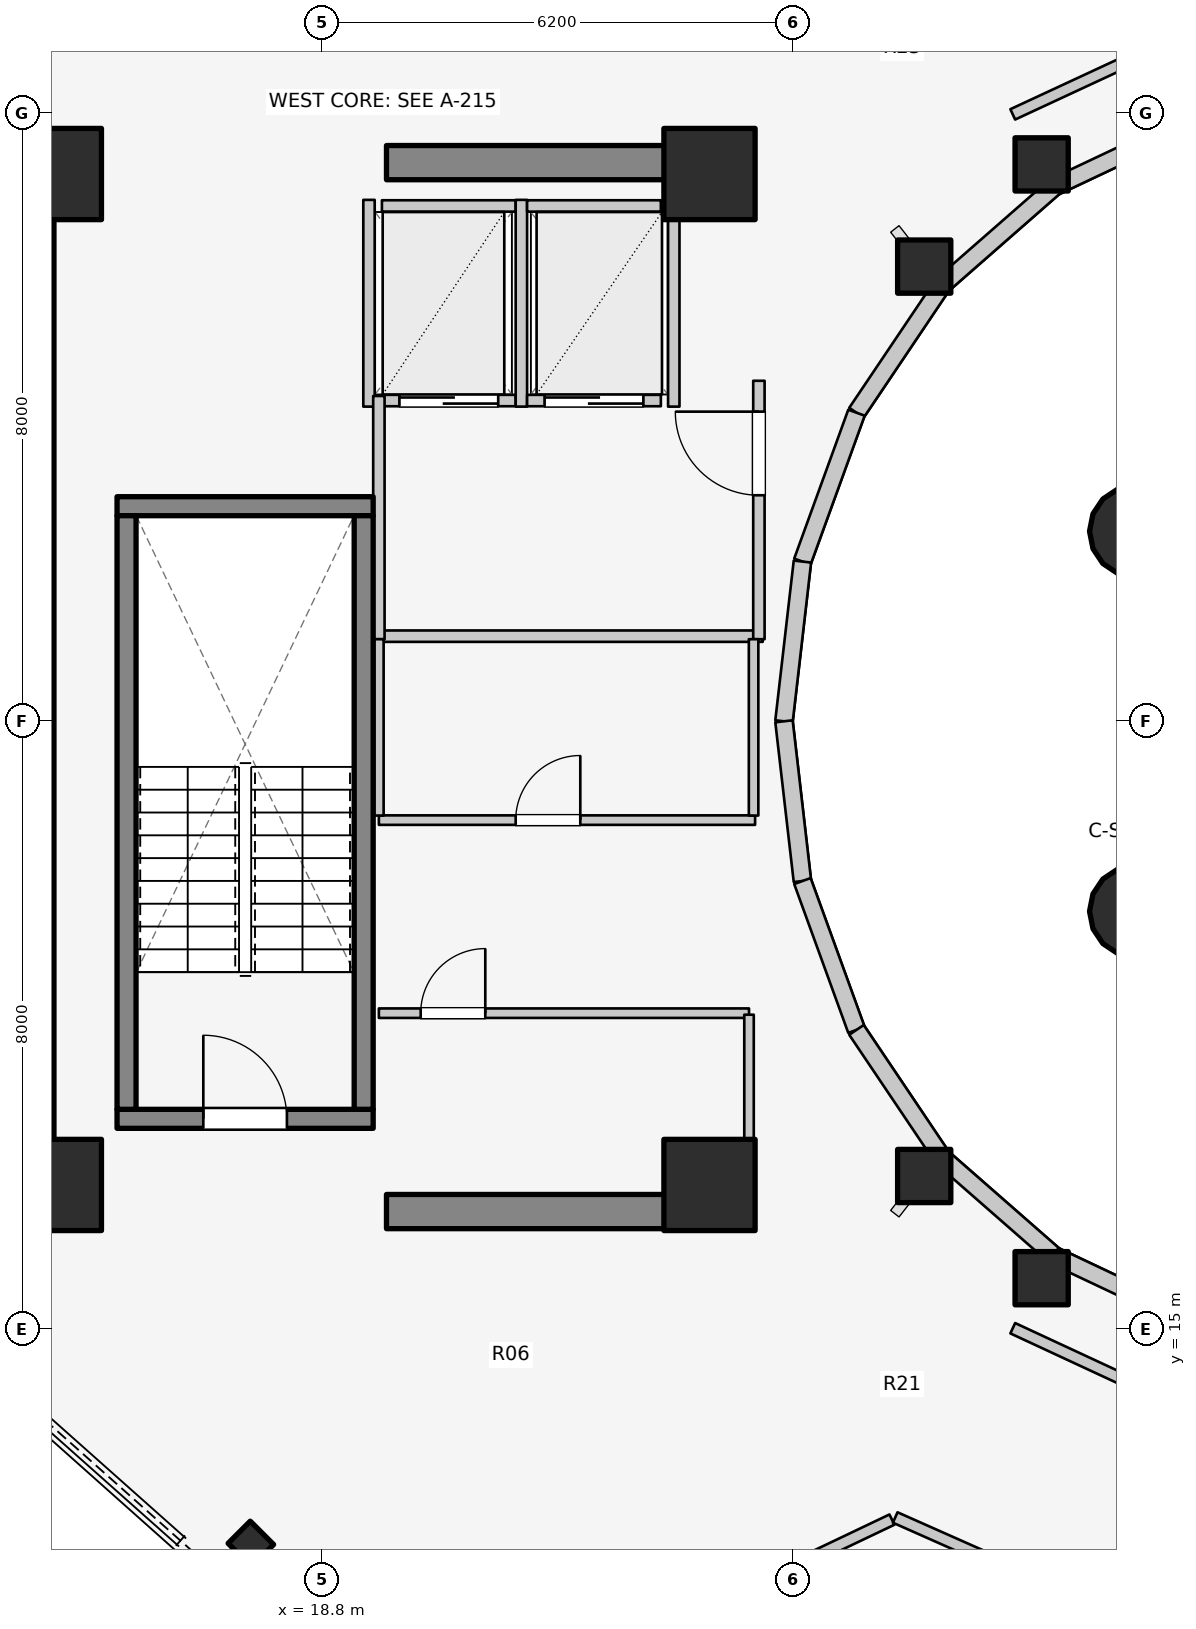
"""IFC4 building model, lengths in metres.
Left out: names, types, materials, properties, quantities, classifications, styles, units other than length and angle.
Written with IfcOpenShell. Run it as: python <this file> out.ifc"""

import sys

from ifc_helpers import new_model, si_unit, direction, frame, frame_2d, origin, origin_2d, place, context, subcontext, project, spatial, rectangle, hollow_circle, i_section, extrude, element, fill, save


model = new_model("IFC4")
c1 = context("Model", 3, precision=1e-05, world=origin(), true_north=direction((0.0, 1.0)))
c2 = subcontext(c1, "Body", "Model", "MODEL_VIEW")
j1 = project(units=[si_unit("LENGTHUNIT", "METRE"), si_unit("PLANEANGLEUNIT", "RADIAN")], contexts=[c1])
p1 = place(None, origin())
s1 = spatial("IfcSite", under=j1, at=p1, CompositionType="ELEMENT")
p2 = place(p1, origin())
s2 = spatial("IfcBuilding", under=s1, at=p2, CompositionType="ELEMENT")
p3 = place(p2, frame((0.0, 0.0, 270.0)))
s3 = spatial("IfcBuildingStorey", under=s2, at=p3, CompositionType="ELEMENT", Elevation=270.0)
p4 = place(p3, frame((15.05, 17.05, 0.0), z_axis=(0.0, 0.0, 1.0), x_axis=(0.0, 1.0, 0.0)))
e1 = element("IfcWall", 1, at=p4, inside=s3, PredefinedType="SHEAR", context=c2, shape_type="SweptSolid", body=[
    extrude(rectangle(XDim=12.8, YDim=0.45, at=frame_2d((6.4, 0.0))), origin(), (0.0, 0.0, 1.0), 3.2),
])
for number, where, z_axis, x_axis in (
    (2, (19.65, 16.55, 0.0), (0.0, 0.0, 1.0), (1.0, 0.0, 0.0)),
    (3, (19.65, 30.35, 0.0), (0.0, 0.0, 1.0), (1.0, 0.0, 0.0)),
):
    element("IfcWall", number, at=place(p3, frame(where, z_axis=z_axis, x_axis=x_axis)), inside=s3, PredefinedType="SHEAR", context=c2, shape_type="SweptSolid", body=[
        extrude(rectangle(XDim=4.5, YDim=0.45, at=frame_2d((2.25, 0.0))), origin(), (0.0, 0.0, 1.0), 3.2),
    ])
p5 = place(p3, frame((16.105, 17.77, 0.0), z_axis=(0.0, 0.0, 1.0), x_axis=(1.0, 0.0, 0.0)))
e4 = element("IfcWall", 4, at=p5, inside=s3, PredefinedType="SOLIDWALL", context=c2, shape_type="SweptSolid", body=[
    extrude(rectangle(XDim=3.37, YDim=0.25, at=frame_2d((1.685, 0.0))), origin(), (0.0, 0.0, 1.0), 3.2),
])
p6 = place(p5, frame((1.135, 0.0, 0.0)))
e5 = element("IfcOpeningElement", 5, at=p6, cuts=e4, PredefinedType="OPENING", context=c2, shape_type="SweptSolid", body=[
    extrude(rectangle(XDim=1.1, YDim=2.1, at=frame_2d((0.55, 1.05))), frame((0.0, 0.135, 0.0), z_axis=(0.0, -1.0, 0.0), x_axis=(1.0, 0.0, 0.0)), (0.0, 0.0, 1.0), 0.27),
])
p7 = place(p3, frame((16.105, 25.83, 0.0), z_axis=(0.0, 0.0, 1.0), x_axis=(1.0, 0.0, 0.0)))
e6 = element("IfcWall", 6, at=p7, inside=s3, PredefinedType="SOLIDWALL", context=c2, shape_type="SweptSolid", body=[
    extrude(rectangle(XDim=3.37, YDim=0.25, at=frame_2d((1.685, 0.0))), origin(), (0.0, 0.0, 1.0), 3.2),
])
for number, where, z_axis, x_axis in (
    (7, (16.23, 17.895, 0.0), (0.0, 0.0, 1.0), (0.0, 1.0, 0.0)),
    (8, (19.35, 17.895, 0.0), (0.0, 0.0, 1.0), (0.0, 1.0, 0.0)),
):
    element("IfcWall", number, at=place(p3, frame(where, z_axis=z_axis, x_axis=x_axis)), inside=s3, PredefinedType="SOLIDWALL", context=c2, shape_type="SweptSolid", body=[
        extrude(rectangle(XDim=7.81, YDim=0.25, at=frame_2d((3.905, 0.0))), origin(), (0.0, 0.0, 1.0), 3.2),
    ])
for number, where, z_axis, x_axis in (
    (9, (15.3, 16.9, 0.0), (0.0, 0.0, 1.0), (1.0, 0.0, 0.0)),
    (10, (23.9, 16.9, 0.0), (0.0, 0.0, 1.0), (1.0, 0.0, 0.0)),
    (11, (23.9, 30.2, 0.0), (0.0, 0.0, 1.0), (1.0, 0.0, 0.0)),
    (12, (15.3, 30.2, 0.0), (0.0, 0.0, 1.0), (1.0, 0.0, 0.0)),
):
    element("IfcColumn", number, at=place(p3, frame(where, z_axis=z_axis, x_axis=x_axis)), inside=s3, PredefinedType="COLUMN", context=c2, shape_type="SweptSolid", body=[
        extrude(rectangle(XDim=1.2, YDim=1.2, at=origin_2d()), origin(), (0.0, 0.0, 1.0), 3.2),
    ])
for number, where, z_axis, x_axis in (
    (13, (28.27, 30.327, 0.0), (0.0, 0.0, 1.0), (1.0, 0.0, 0.0)),
    (14, (26.725, 28.982, 0.0), (0.0, 0.0, 1.0), (1.0, 0.0, 0.0)),
    (15, (26.725, 17.018, 0.0), (0.0, 0.0, 1.0), (1.0, 0.0, 0.0)),
):
    element("IfcColumn", number, at=place(p3, frame(where, z_axis=z_axis, x_axis=x_axis)), inside=s3, PredefinedType="COLUMN", context=c2, shape_type="SweptSolid", body=[
        extrude(rectangle(XDim=0.7, YDim=0.7, at=origin_2d()), origin(), (0.0, 0.0, 1.0), 3.2),
    ])
p8 = place(p3, frame((17.866, 12.177, 0.0), z_axis=(0.0, 0.0, 1.0), x_axis=(-0.707106781187, -0.707106781187, 0.0)))
e16 = element("IfcColumn", 16, at=p8, inside=s3, PredefinedType="COLUMN", context=c2, shape_type="SweptSolid", body=[
    extrude(i_section(OverallWidth=0.412, OverallDepth=0.435, WebThickness=0.036, FlangeThickness=0.057, FilletRadius=0.025, at=origin_2d()), origin(), (0.0, 0.0, 1.0), 3.2),
])
p9 = place(p3, frame((28.27, 15.673, 0.0), z_axis=(0.0, 0.0, 1.0), x_axis=(1.0, 0.0, 0.0)))
e17 = element("IfcColumn", 17, at=p9, inside=s3, PredefinedType="COLUMN", context=c2, shape_type="SweptSolid", body=[
    extrude(rectangle(XDim=0.7, YDim=0.7, at=origin_2d()), origin(), (0.0, 0.0, 1.0), 3.2),
])
for number, where, z_axis, x_axis in (
    (18, (29.5, 20.5, 0.0), (0.0, 0.0, 1.0), (1.0, 0.0, 0.0)),
    (19, (29.5, 25.5, 0.0), (0.0, 0.0, 1.0), (1.0, 0.0, 0.0)),
):
    element("IfcColumn", number, at=place(p3, frame(where, z_axis=z_axis, x_axis=x_axis)), inside=s3, PredefinedType="PILASTER", context=c2, shape_type="SweptSolid", body=[
        extrude(hollow_circle(Radius=0.6, WallThickness=0.032, at=origin_2d()), origin(), (0.0, 0.0, 1.0), 3.2),
    ])
p10 = place(p3, frame((30.157, 30.843, 0.0), z_axis=(0.0, 0.0, 1.0), x_axis=(-0.904179699603, -0.427152280606, 0.0)))
e20 = element("IfcWall", 20, at=p10, inside=s3, PredefinedType="STANDARD", context=c2, shape_type="SweptSolid", body=[
    extrude(rectangle(XDim=1.899, YDim=0.23, at=frame_2d((0.95, 0.0))), origin(), (0.0, 0.0, 1.0), 1.32),
])
p11 = place(p3, frame((28.44, 30.032, 0.0), z_axis=(0.0, 0.0, 1.0), x_axis=(-0.752576694707, -0.658504607869, 0.0)))
e21 = element("IfcWall", 21, at=p11, inside=s3, PredefinedType="STANDARD", context=c2, shape_type="SweptSolid", body=[
    extrude(rectangle(XDim=1.959, YDim=0.23, at=frame_2d((0.98, 0.0))), origin(), (0.0, 0.0, 1.0), 1.32),
])
p12 = place(p3, frame((26.965, 28.742, 0.0), z_axis=(0.0, 0.0, 1.0), x_axis=(-0.558197800898, -0.829707909492, 0.0)))
e22 = element("IfcWall", 22, at=p12, inside=s3, PredefinedType="STANDARD", context=c2, shape_type="SweptSolid", body=[
    extrude(rectangle(XDim=2.027, YDim=0.23, at=frame_2d((1.013, 0.0))), origin(), (0.0, 0.0, 1.0), 1.32),
])
p13 = place(p3, frame((25.834, 27.06, 0.0), z_axis=(0.0, 0.0, 1.0), x_axis=(-0.341423187295, -0.93990968033, 0.0)))
e23 = element("IfcWall", 23, at=p13, inside=s3, PredefinedType="STANDARD", context=c2, shape_type="SweptSolid", body=[
    extrude(rectangle(XDim=2.084, YDim=0.23, at=frame_2d((1.042, 0.0))), origin(), (0.0, 0.0, 1.0), 2.9),
])
for number, where, z_axis, x_axis in (
    (24, (25.123, 25.102, 0.0), (0.0, 0.0, 1.0), (-0.115, -0.993, 0.0)),
    (25, (24.88, 23.0, 0.0), (0.0, 0.0, 1.0), (0.115, -0.993, 0.0)),
):
    element("IfcWall", number, at=place(p3, frame(where, z_axis=z_axis, x_axis=x_axis)), inside=s3, PredefinedType="STANDARD", context=c2, shape_type="SweptSolid", body=[
        extrude(rectangle(XDim=2.115, YDim=0.23, at=frame_2d((1.058, 0.0))), origin(), (0.0, 0.0, 1.0), 2.9),
    ])
p14 = place(p3, frame((25.123, 20.898, 0.0), z_axis=(0.0, 0.0, 1.0), x_axis=(0.341423187295, -0.93990968033, 0.0)))
e26 = element("IfcWall", 26, at=p14, inside=s3, PredefinedType="STANDARD", context=c2, shape_type="SweptSolid", body=[
    extrude(rectangle(XDim=2.084, YDim=0.23, at=frame_2d((1.042, 0.0))), origin(), (0.0, 0.0, 1.0), 2.9),
])
p15 = place(p3, frame((25.834, 18.94, 0.0), z_axis=(0.0, 0.0, 1.0), x_axis=(0.558197800898, -0.829707909492, 0.0)))
e27 = element("IfcWall", 27, at=p15, inside=s3, PredefinedType="STANDARD", context=c2, shape_type="SweptSolid", body=[
    extrude(rectangle(XDim=2.027, YDim=0.23, at=frame_2d((1.013, 0.0))), origin(), (0.0, 0.0, 1.0), 1.32),
])
p16 = place(p3, frame((26.965, 17.258, 0.0), z_axis=(0.0, 0.0, 1.0), x_axis=(0.752576694707, -0.658504607869, 0.0)))
e28 = element("IfcWall", 28, at=p16, inside=s3, PredefinedType="STANDARD", context=c2, shape_type="SweptSolid", body=[
    extrude(rectangle(XDim=1.959, YDim=0.23, at=frame_2d((0.98, 0.0))), origin(), (0.0, 0.0, 1.0), 1.32),
])
p17 = place(p3, frame((28.44, 15.968, 0.0), z_axis=(0.0, 0.0, 1.0), x_axis=(0.904179699603, -0.427152280606, 0.0)))
e29 = element("IfcWall", 29, at=p17, inside=s3, PredefinedType="STANDARD", context=c2, shape_type="SweptSolid", body=[
    extrude(rectangle(XDim=1.899, YDim=0.23, at=frame_2d((0.95, 0.0))), origin(), (0.0, 0.0, 1.0), 1.32),
])
p18 = place(p3, frame((17.453, 34.236, 0.0), z_axis=(0.0, 0.0, 1.0), x_axis=(-0.747315206756, -0.664469699649, 0.0)))
e30 = element("IfcWall", 30, at=p18, inside=s3, PredefinedType="STANDARD", context=c2, shape_type="SweptSolid", body=[
    extrude(rectangle(XDim=4.008, YDim=0.26, at=frame_2d((2.004, 0.0))), origin(), (0.0, 0.0, 1.0), 1.32),
])
p19 = place(p3, frame((19.59, 27.22, 0.0), z_axis=(0.0, 0.0, 1.0), x_axis=(1.0, 0.0, 0.0)))
e31 = element("IfcWall", 31, at=p19, inside=s3, PredefinedType="SOLIDWALL", context=c2, shape_type="SweptSolid", body=[
    extrude(rectangle(XDim=1.76, YDim=0.15, at=frame_2d((0.88, 0.0))), origin(), (0.0, 0.0, 1.0), 2.915),
])
p20 = place(p19, frame((0.23, 0.0, 0.0)))
e32 = element("IfcOpeningElement", 32, at=p20, cuts=e31, PredefinedType="OPENING", context=c2, shape_type="SweptSolid", body=[
    extrude(rectangle(XDim=1.3, YDim=2.1, at=frame_2d((0.65, 1.05))), frame((0.0, 0.085, 0.0), z_axis=(0.0, -1.0, 0.0), x_axis=(1.0, 0.0, 0.0)), (0.0, 0.0, 1.0), 0.17),
])
p21 = place(p3, frame((19.59, 29.78, 0.0), z_axis=(0.0, 0.0, 1.0), x_axis=(1.0, 0.0, 0.0)))
e33 = element("IfcWall", 33, at=p21, inside=s3, PredefinedType="SOLIDWALL", context=c2, shape_type="SweptSolid", body=[
    extrude(rectangle(XDim=1.76, YDim=0.15, at=frame_2d((0.88, 0.0))), origin(), (0.0, 0.0, 1.0), 2.915),
])
for number, where, z_axis, x_axis in (
    (34, (19.42, 27.14, 0.0), (0.0, 0.0, 1.0), (0.0, 1.0, 0.0)),
    (35, (21.425, 27.14, 0.0), (0.0, 0.0, 1.0), (0.0, 1.0, 0.0)),
):
    element("IfcWall", number, at=place(p3, frame(where, z_axis=z_axis, x_axis=x_axis)), inside=s3, PredefinedType="SOLIDWALL", context=c2, shape_type="SweptSolid", body=[
        extrude(rectangle(XDim=2.72, YDim=0.15, at=frame_2d((1.36, 0.0))), origin(), (0.0, 0.0, 1.0), 2.915),
    ])
p22 = place(p3, frame((21.5, 27.22, 0.0), z_axis=(0.0, 0.0, 1.0), x_axis=(1.0, 0.0, 0.0)))
e36 = element("IfcWall", 36, at=p22, inside=s3, PredefinedType="SOLIDWALL", context=c2, shape_type="SweptSolid", body=[
    extrude(rectangle(XDim=1.76, YDim=0.15, at=frame_2d((0.88, 0.0))), origin(), (0.0, 0.0, 1.0), 2.915),
])
p23 = place(p22, frame((0.23, 0.0, 0.0)))
e37 = element("IfcOpeningElement", 37, at=p23, cuts=e36, PredefinedType="OPENING", context=c2, shape_type="SweptSolid", body=[
    extrude(rectangle(XDim=1.3, YDim=2.1, at=frame_2d((0.65, 1.05))), frame((0.0, 0.085, 0.0), z_axis=(0.0, -1.0, 0.0), x_axis=(1.0, 0.0, 0.0)), (0.0, 0.0, 1.0), 0.17),
])
p24 = place(p3, frame((21.5, 29.78, 0.0), z_axis=(0.0, 0.0, 1.0), x_axis=(1.0, 0.0, 0.0)))
e38 = element("IfcWall", 38, at=p24, inside=s3, PredefinedType="SOLIDWALL", context=c2, shape_type="SweptSolid", body=[
    extrude(rectangle(XDim=1.76, YDim=0.15, at=frame_2d((0.88, 0.0))), origin(), (0.0, 0.0, 1.0), 2.915),
])
p25 = place(p3, frame((23.43, 27.14, 0.0), z_axis=(0.0, 0.0, 1.0), x_axis=(0.0, 1.0, 0.0)))
e39 = element("IfcWall", 39, at=p25, inside=s3, PredefinedType="SOLIDWALL", context=c2, shape_type="SweptSolid", body=[
    extrude(rectangle(XDim=2.72, YDim=0.15, at=frame_2d((1.36, 0.0))), origin(), (0.0, 0.0, 1.0), 2.915),
])
p26 = place(p3, frame((19.52, 24.12, 0.0), z_axis=(0.0, 0.0, 1.0), x_axis=(1.0, 0.0, 0.0)))
e40 = element("IfcWall", 40, at=p26, inside=s3, PredefinedType="PARTITIONING", context=c2, shape_type="SweptSolid", body=[
    extrude(rectangle(XDim=5.08, YDim=0.15, at=frame_2d((2.54, 0.0))), origin(), (0.0, 0.0, 1.0), 2.22),
])
p27 = place(p3, frame((19.55, 24.08, 0.0), z_axis=(0.0, 0.0, 1.0), x_axis=(0.0, 1.0, 0.0)))
e41 = element("IfcWall", 41, at=p27, inside=s3, PredefinedType="PARTITIONING", context=c2, shape_type="SweptSolid", body=[
    extrude(rectangle(XDim=3.2, YDim=0.15, at=frame_2d((1.6, 0.0))), origin(), (0.0, 0.0, 1.0), 2.915),
])
p28 = place(p3, frame((24.55, 24.08, 0.0), z_axis=(0.0, 0.0, 1.0), x_axis=(0.0, 1.0, 0.0)))
e42 = element("IfcWall", 42, at=p28, inside=s3, PredefinedType="PARTITIONING", context=c2, shape_type="SweptSolid", body=[
    extrude(rectangle(XDim=3.4, YDim=0.15, at=frame_2d((1.7, 0.0))), origin(), (0.0, 0.0, 1.0), 2.915),
])
p29 = place(p28, frame((1.894, 0.0, 0.0)))
e43 = element("IfcOpeningElement", 43, at=p29, cuts=e42, PredefinedType="OPENING", context=c2, shape_type="SweptSolid", body=[
    extrude(rectangle(XDim=1.1, YDim=2.1, at=frame_2d((0.55, 1.05))), frame((0.0, 0.085, 0.0), z_axis=(0.0, -1.0, 0.0), x_axis=(1.0, 0.0, 0.0)), (0.0, 0.0, 1.0), 0.17),
])
p30 = place(p3, frame((19.55, 19.16, 0.0), z_axis=(0.0, 0.0, 1.0), x_axis=(1.0, 0.0, 0.0)))
e44 = element("IfcWall", 44, at=p30, inside=s3, PredefinedType="PARTITIONING", context=c2, shape_type="SweptSolid", body=[
    extrude(rectangle(XDim=4.87, YDim=0.125, at=frame_2d((2.435, 0.0))), origin(), (0.0, 0.0, 1.0), 2.22),
])
p31 = place(p30, frame((0.55, 0.0, 0.0)))
e45 = element("IfcOpeningElement", 45, at=p31, cuts=e44, PredefinedType="OPENING", context=c2, shape_type="SweptSolid", body=[
    extrude(rectangle(XDim=0.85, YDim=2.05, at=frame_2d((0.425, 1.025))), frame((0.0, 0.073, 0.0), z_axis=(0.0, -1.0, 0.0), x_axis=(1.0, 0.0, 0.0)), (0.0, 0.0, 1.0), 0.145),
])
p32 = place(p3, frame((24.42, 17.1, 0.0), z_axis=(0.0, 0.0, 1.0), x_axis=(0.0, 1.0, 0.0)))
e46 = element("IfcWall", 46, at=p32, inside=s3, PredefinedType="PARTITIONING", context=c2, shape_type="SweptSolid", body=[
    extrude(rectangle(XDim=2.04, YDim=0.125, at=frame_2d((1.02, 0.0))), origin(), (0.0, 0.0, 1.0), 2.491),
])
p33 = place(p3, frame((19.55, 21.7, 0.0), z_axis=(0.0, 0.0, 1.0), x_axis=(1.0, 0.0, 0.0)))
e47 = element("IfcWall", 47, at=p33, inside=s3, PredefinedType="PARTITIONING", context=c2, shape_type="SweptSolid", body=[
    extrude(rectangle(XDim=4.95, YDim=0.125, at=frame_2d((2.475, 0.0))), origin(), (0.0, 0.0, 1.0), 2.22),
])
p34 = place(p33, frame((1.8, 0.0, 0.0)))
e48 = element("IfcOpeningElement", 48, at=p34, cuts=e47, PredefinedType="OPENING", context=c2, shape_type="SweptSolid", body=[
    extrude(rectangle(XDim=0.85, YDim=2.05, at=frame_2d((0.425, 1.025))), frame((0.0, 0.073, 0.0), z_axis=(0.0, -1.0, 0.0), x_axis=(1.0, 0.0, 0.0)), (0.0, 0.0, 1.0), 0.145),
])
for number, where, z_axis, x_axis in (
    (49, (19.55, 21.76, 0.0), (0.0, 0.0, 1.0), (0.0, 1.0, 0.0)),
    (50, (24.48, 21.76, 0.0), (0.0, 0.0, 1.0), (0.0, 1.0, 0.0)),
):
    element("IfcWall", number, at=place(p3, frame(where, z_axis=z_axis, x_axis=x_axis)), inside=s3, PredefinedType="PARTITIONING", context=c2, shape_type="SweptSolid", body=[
        extrude(rectangle(XDim=2.32, YDim=0.125, at=frame_2d((1.16, 0.0))), origin(), (0.0, 0.0, 1.0), 2.915),
    ])
for number, where, z_axis, x_axis in (
    (51, (29.873, 31.906, 0.0), (0.0, 0.0, 1.0), (-0.907, -0.421, 0.0)),
    (52, (27.89, 15.015, 0.0), (0.0, 0.0, 1.0), (0.907, -0.421, 0.0)),
):
    element("IfcWall", number, at=place(p3, frame(where, z_axis=z_axis, x_axis=x_axis)), inside=s3, PredefinedType="PARTITIONING", context=c2, shape_type="SweptSolid", body=[
        extrude(rectangle(XDim=2.186, YDim=0.15, at=frame_2d((1.093, 0.0))), origin(), (0.0, 0.0, 1.0), 1.32),
    ])
p35 = place(p3, frame((26.3, 12.497, 0.0), z_axis=(0.0, 0.0, 1.0), x_axis=(-0.902738701359, -0.430189303758, 0.0)))
e53 = element("IfcWall", 53, at=p35, inside=s3, PredefinedType="PARTITIONING", context=c2, shape_type="SweptSolid", body=[
    extrude(rectangle(XDim=5.521, YDim=0.15, at=frame_2d((2.761, 0.0))), origin(), (0.0, 0.0, 1.0), 1.32),
])
p36 = place(p3, frame((26.343, 12.525, 0.0), z_axis=(0.0, 0.0, 1.0), x_axis=(0.913989848226, -0.405737054432, 0.0)))
e54 = element("IfcWall", 54, at=p36, inside=s3, PredefinedType="PARTITIONING", context=c2, shape_type="SweptSolid", body=[
    extrude(rectangle(XDim=2.991, YDim=0.15, at=frame_2d((1.496, 0.0))), origin(), (0.0, 0.0, 1.0), 1.32),
])
p37 = place(p6, origin())
e55 = element("IfcDoor", 55, at=p37, inside=s3, OperationType="SINGLE_SWING_LEFT", PredefinedType="DOOR", context=c2, shape_type="SweptSolid", body=[
    extrude(rectangle(XDim=1.1, YDim=2.1, at=frame_2d((0.55, 1.05))), frame((0.0, 0.025, 0.0), z_axis=(0.0, -1.0, 0.0), x_axis=(1.0, 0.0, 0.0)), (0.0, 0.0, 1.0), 0.05),
])
fill(e5, e55)
p38 = place(p20, origin())
e56 = element("IfcDoor", 56, at=p38, inside=s3, OperationType="DOUBLE_DOOR_SLIDING", PredefinedType="DOOR", context=c2, shape_type="SweptSolid", body=[
    extrude(rectangle(XDim=1.3, YDim=2.1, at=frame_2d((0.65, 1.05))), frame((0.0, 0.025, 0.0), z_axis=(0.0, -1.0, 0.0), x_axis=(1.0, 0.0, 0.0)), (0.0, 0.0, 1.0), 0.05),
])
fill(e32, e56)
p39 = place(p23, origin())
e57 = element("IfcDoor", 57, at=p39, inside=s3, OperationType="DOUBLE_DOOR_SLIDING", PredefinedType="DOOR", context=c2, shape_type="SweptSolid", body=[
    extrude(rectangle(XDim=1.3, YDim=2.1, at=frame_2d((0.65, 1.05))), frame((0.0, 0.025, 0.0), z_axis=(0.0, -1.0, 0.0), x_axis=(1.0, 0.0, 0.0)), (0.0, 0.0, 1.0), 0.05),
])
fill(e37, e57)
p40 = place(p29, origin())
e58 = element("IfcDoor", 58, at=p40, inside=s3, OperationType="SINGLE_SWING_RIGHT", PredefinedType="DOOR", context=c2, shape_type="SweptSolid", body=[
    extrude(rectangle(XDim=1.1, YDim=2.1, at=frame_2d((0.55, 1.05))), frame((0.0, 0.025, 0.0), z_axis=(0.0, -1.0, 0.0), x_axis=(1.0, 0.0, 0.0)), (0.0, 0.0, 1.0), 0.05),
])
fill(e43, e58)
p41 = place(p31, origin())
e59 = element("IfcDoor", 59, at=p41, inside=s3, OperationType="SINGLE_SWING_RIGHT", PredefinedType="DOOR", context=c2, shape_type="SweptSolid", body=[
    extrude(rectangle(XDim=0.85, YDim=2.05, at=frame_2d((0.425, 1.025))), frame((0.0, 0.025, 0.0), z_axis=(0.0, -1.0, 0.0), x_axis=(1.0, 0.0, 0.0)), (0.0, 0.0, 1.0), 0.05),
])
fill(e45, e59)
p42 = place(p34, origin())
e60 = element("IfcDoor", 60, at=p42, inside=s3, OperationType="SINGLE_SWING_RIGHT", PredefinedType="DOOR", context=c2, shape_type="SweptSolid", body=[
    extrude(rectangle(XDim=0.85, YDim=2.05, at=frame_2d((0.425, 1.025))), frame((0.0, 0.025, 0.0), z_axis=(0.0, -1.0, 0.0), x_axis=(1.0, 0.0, 0.0)), (0.0, 0.0, 1.0), 0.05),
])
fill(e48, e60)
save(model, sys.argv[1])
